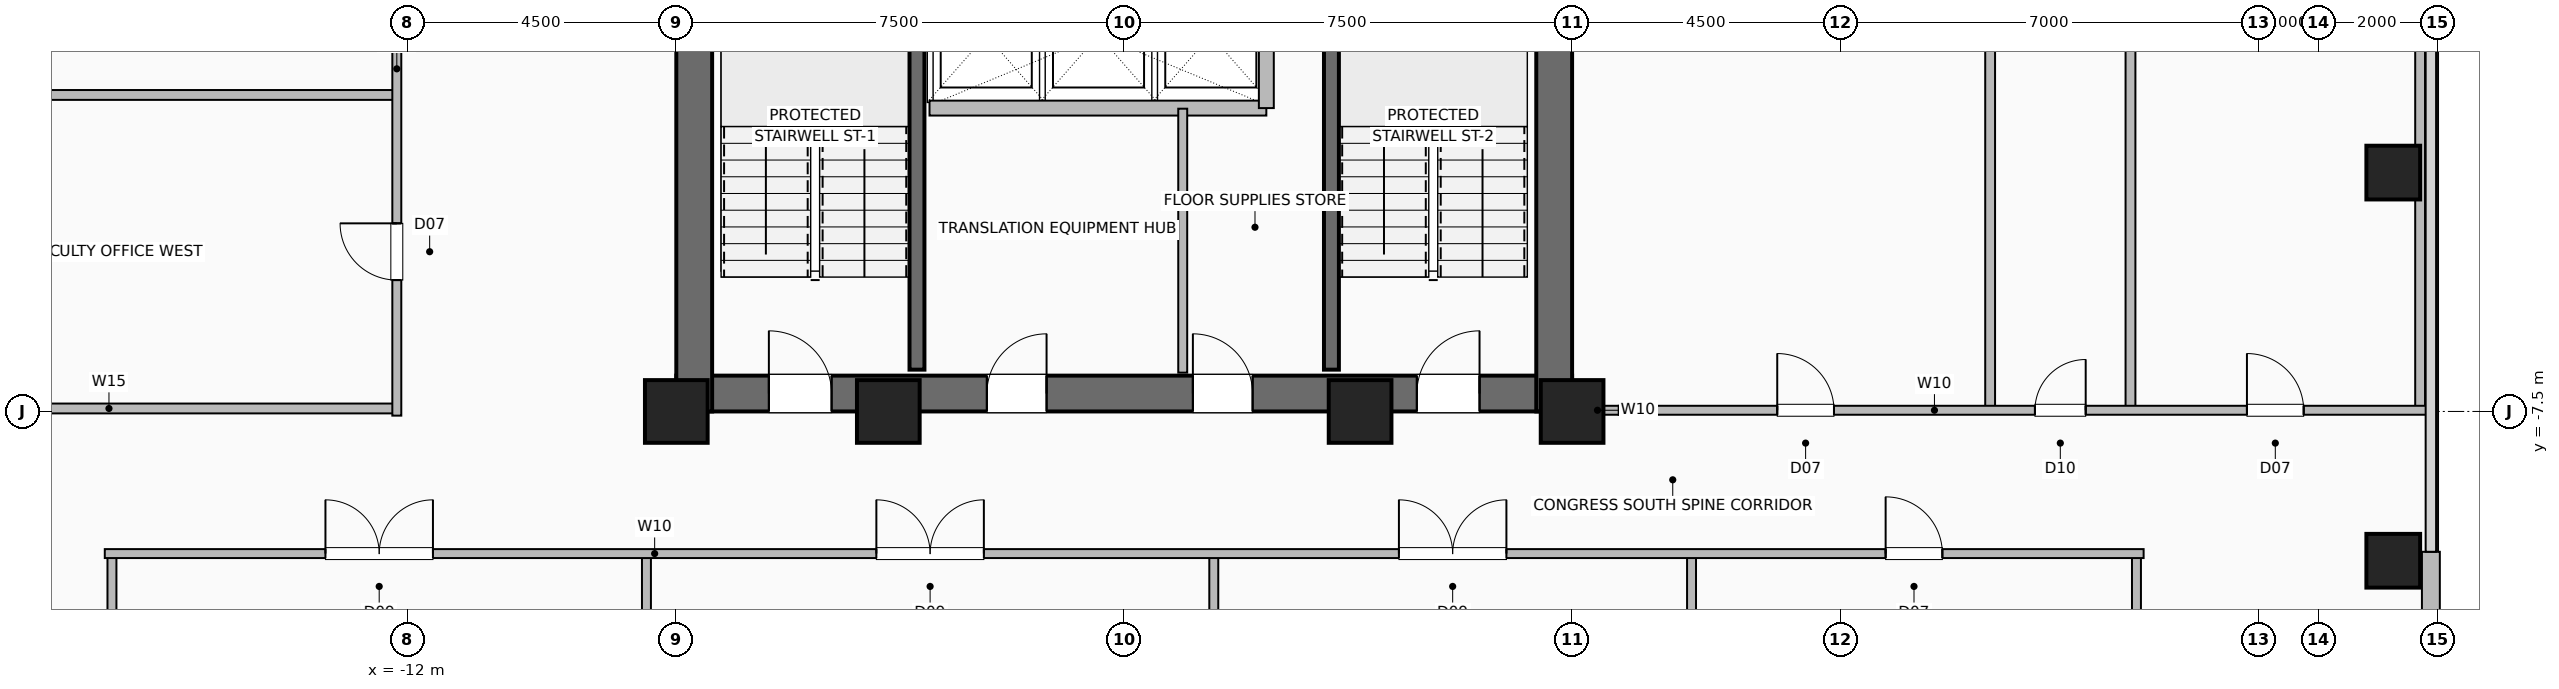
"""IFC4 building model, lengths in metres.
Left out: names, types, materials, properties, quantities, classifications, styles, units other than length and angle.
Written with IfcOpenShell. Run it as: python <this file> out.ifc"""

import sys

from ifc_helpers import new_model, si_unit, direction, frame, frame_2d, origin, origin_2d, place, context, subcontext, project, spatial, rectangle, hollow_rectangle, extrude, element, fill, save


model = new_model("IFC4")
c1 = context("Model", 3, precision=1e-05, world=origin(), true_north=direction((0.0, 1.0)))
c2 = subcontext(c1, "Body", "Model", "MODEL_VIEW")
j1 = project(units=[si_unit("LENGTHUNIT", "METRE"), si_unit("PLANEANGLEUNIT", "RADIAN")], contexts=[c1])
p1 = place(None, origin())
s1 = spatial("IfcSite", under=j1, at=p1, CompositionType="ELEMENT")
p2 = place(p1, origin())
s2 = spatial("IfcBuilding", under=s1, at=p2, CompositionType="ELEMENT")
p3 = place(p2, frame((0.0, 0.0, 133.6)))
s3 = spatial("IfcBuildingStorey", under=s2, at=p3, CompositionType="ELEMENT", Elevation=133.6)
for number, where, z_axis, x_axis in (
    (1, (-7.5, -7.5, 0.0), (0.0, 0.0, 1.0), (1.0, 0.0, 0.0)),
    (2, (-3.95, -7.5, 0.0), (0.0, 0.0, 1.0), (1.0, 0.0, 0.0)),
    (3, (3.95, -7.5, 0.0), (0.0, 0.0, 1.0), (1.0, 0.0, 0.0)),
    (4, (7.5, -7.5, 0.0), (0.0, 0.0, 1.0), (1.0, 0.0, 0.0)),
):
    element("IfcColumn", number, at=place(p3, frame(where, z_axis=z_axis, x_axis=x_axis)), inside=s3, PredefinedType="COLUMN", context=c2, shape_type="SweptSolid", body=[
        extrude(hollow_rectangle(XDim=1.05, YDim=1.05, WallThickness=0.05, at=origin_2d()), origin(), (0.0, 0.0, 1.0), 3.6),
    ])
for number, where, z_axis, x_axis in (
    (5, (21.25, -10.0, 0.0), (0.0, 0.0, 1.0), (1.0, 0.0, 0.0)),
    (6, (21.25, -3.5, 0.0), (0.0, 0.0, 1.0), (1.0, 0.0, 0.0)),
):
    element("IfcColumn", number, at=place(p3, frame(where, z_axis=z_axis, x_axis=x_axis)), inside=s3, PredefinedType="COLUMN", context=c2, shape_type="SweptSolid", body=[
        extrude(hollow_rectangle(XDim=0.9, YDim=0.9, WallThickness=0.045, at=origin_2d()), origin(), (0.0, 0.0, 1.0), 3.6),
    ])
p4 = place(p3, frame((21.88, -16.15, 0.0), z_axis=(0.0, 0.0, 1.0), x_axis=(0.0, 1.0, 0.0)))
e7 = element("IfcWall", 7, at=p4, inside=s3, PredefinedType="SOLIDWALL", context=c2, shape_type="SweptSolid", body=[
    extrude(rectangle(XDim=6.3, YDim=0.3, at=frame_2d((3.15, 0.0))), origin(), (0.0, 0.0, 1.0), 3.36),
])
p5 = place(p3, frame((-7.5, -7.2, 0.0), z_axis=(0.0, 0.0, 1.0), x_axis=(1.0, 0.0, 0.0)))
e8 = element("IfcWall", 8, at=p5, inside=s3, PredefinedType="SHEAR", context=c2, shape_type="SweptSolid", body=[
    extrude(rectangle(XDim=15.0, YDim=0.6, at=frame_2d((7.5, 0.0))), origin(), (0.0, 0.0, 1.0), 3.36),
])
p6 = place(p5, frame((1.55, 0.0, 0.0)))
e9 = element("IfcOpeningElement", 9, at=p6, cuts=e8, PredefinedType="OPENING", context=c2, shape_type="SweptSolid", body=[
    extrude(rectangle(XDim=1.05, YDim=2.08, at=frame_2d((0.525, 1.04))), frame((0.0, 0.31, 0.0), z_axis=(0.0, -1.0, 0.0), x_axis=(1.0, 0.0, 0.0)), (0.0, 0.0, 1.0), 0.62),
])
p7 = place(p5, frame((12.4, 0.0, 0.0)))
e10 = element("IfcOpeningElement", 10, at=p7, cuts=e8, PredefinedType="OPENING", context=c2, shape_type="SweptSolid", body=[
    extrude(rectangle(XDim=1.05, YDim=2.08, at=frame_2d((0.525, 1.04))), frame((0.0, 0.31, 0.0), z_axis=(0.0, -1.0, 0.0), x_axis=(1.0, 0.0, 0.0)), (0.0, 0.0, 1.0), 0.62),
])
p8 = place(p5, frame((5.2, 0.0, 0.0)))
e11 = element("IfcOpeningElement", 11, at=p8, cuts=e8, PredefinedType="OPENING", context=c2, shape_type="SweptSolid", body=[
    extrude(rectangle(XDim=1.0, YDim=2.08, at=frame_2d((0.5, 1.04))), frame((0.0, 0.31, 0.0), z_axis=(0.0, -1.0, 0.0), x_axis=(1.0, 0.0, 0.0)), (0.0, 0.0, 1.0), 0.62),
])
p9 = place(p5, frame((8.65, 0.0, 0.0)))
e12 = element("IfcOpeningElement", 12, at=p9, cuts=e8, PredefinedType="OPENING", context=c2, shape_type="SweptSolid", body=[
    extrude(rectangle(XDim=1.0, YDim=2.08, at=frame_2d((0.5, 1.04))), frame((0.0, 0.31, 0.0), z_axis=(0.0, -1.0, 0.0), x_axis=(1.0, 0.0, 0.0)), (0.0, 0.0, 1.0), 0.62),
])
p10 = place(p3, frame((-7.2, -7.5, 0.0), z_axis=(0.0, 0.0, 1.0), x_axis=(0.0, 1.0, 0.0)))
e13 = element("IfcWall", 13, at=p10, inside=s3, PredefinedType="SHEAR", context=c2, shape_type="SweptSolid", body=[
    extrude(rectangle(XDim=15.0, YDim=0.6, at=frame_2d((7.5, 0.0))), origin(), (0.0, 0.0, 1.0), 3.36),
])
p11 = place(p10, frame((9.5, 0.0, 0.0)))
e14 = element("IfcOpeningElement", 14, at=p11, cuts=e13, PredefinedType="OPENING", context=c2, shape_type="SweptSolid", body=[
    extrude(rectangle(XDim=1.0, YDim=2.08, at=frame_2d((0.5, 1.04))), frame((0.0, 0.31, 0.0), z_axis=(0.0, -1.0, 0.0), x_axis=(1.0, 0.0, 0.0)), (0.0, 0.0, 1.0), 0.62),
])
p12 = place(p3, frame((7.2, -7.5, 0.0), z_axis=(0.0, 0.0, 1.0), x_axis=(0.0, 1.0, 0.0)))
e15 = element("IfcWall", 15, at=p12, inside=s3, PredefinedType="SHEAR", context=c2, shape_type="SweptSolid", body=[
    extrude(rectangle(XDim=15.0, YDim=0.6, at=frame_2d((7.5, 0.0))), origin(), (0.0, 0.0, 1.0), 3.36),
])
for number, where, z_axis, x_axis in (
    (16, (-3.47, -6.8, 0.0), (0.0, 0.0, 1.0), (0.0, 1.0, 0.0)),
    (17, (3.47, -6.8, 0.0), (0.0, 0.0, 1.0), (0.0, 1.0, 0.0)),
):
    element("IfcWall", number, at=place(p3, frame(where, z_axis=z_axis, x_axis=x_axis)), inside=s3, PredefinedType="SHEAR", context=c2, shape_type="SweptSolid", body=[
        extrude(rectangle(XDim=7.72, YDim=0.25, at=frame_2d((3.86, 0.0))), origin(), (0.0, 0.0, 1.0), 3.36),
    ])
p13 = place(p3, frame((-3.26, -2.42, 0.0), z_axis=(0.0, 0.0, 1.0), x_axis=(1.0, 0.0, 0.0)))
e18 = element("IfcWall", 18, at=p13, inside=s3, PredefinedType="SHEAR", context=c2, shape_type="SweptSolid", body=[
    extrude(rectangle(XDim=5.64, YDim=0.25, at=frame_2d((2.82, 0.0))), origin(), (0.0, 0.0, 1.0), 3.36),
])
p14 = place(p3, frame((2.38, -2.42, 0.0), z_axis=(0.0, 0.0, 1.0), x_axis=(0.0, 1.0, 0.0)))
e19 = element("IfcWall", 19, at=p14, inside=s3, PredefinedType="SHEAR", context=c2, shape_type="SweptSolid", body=[
    extrude(rectangle(XDim=2.44, YDim=0.25, at=frame_2d((1.22, 0.0))), origin(), (0.0, 0.0, 1.0), 3.36),
])
p15 = place(p3, frame((0.98, -6.85, 0.0), z_axis=(0.0, 0.0, 1.0), x_axis=(0.0, 1.0, 0.0)))
e20 = element("IfcWall", 20, at=p15, inside=s3, PredefinedType="PARTITIONING", context=c2, shape_type="SweptSolid", body=[
    extrude(rectangle(XDim=4.42, YDim=0.15, at=frame_2d((2.21, 0.0))), origin(), (0.0, 0.0, 1.0), 3.36),
])
for number, where, z_axis, x_axis in (
    (21, (-16.95, -21.82, 0.0), (0.0, 0.0, 1.0), (0.0, 1.0, 0.0)),
    (22, (-8.0, -21.82, 0.0), (0.0, 0.0, 1.0), (0.0, 1.0, 0.0)),
    (23, (1.5, -21.82, 0.0), (0.0, 0.0, 1.0), (0.0, 1.0, 0.0)),
    (24, (9.5, -21.82, 0.0), (0.0, 0.0, 1.0), (0.0, 1.0, 0.0)),
    (25, (16.95, -21.82, 0.0), (0.0, 0.0, 1.0), (0.0, 1.0, 0.0)),
):
    element("IfcWall", number, at=place(p3, frame(where, z_axis=z_axis, x_axis=x_axis)), inside=s3, PredefinedType="PARTITIONING", context=c2, shape_type="SweptSolid", body=[
        extrude(rectangle(XDim=11.94, YDim=0.15, at=frame_2d((5.97, 0.0))), origin(), (0.0, 0.0, 1.0), 3.36),
    ])
p16 = place(p3, frame((-17.07, -9.88, 0.0), z_axis=(0.0, 0.0, 1.0), x_axis=(1.0, 0.0, 0.0)))
e26 = element("IfcWall", 26, at=p16, inside=s3, PredefinedType="PARTITIONING", context=c2, shape_type="SweptSolid", body=[
    extrude(rectangle(XDim=34.14, YDim=0.15, at=frame_2d((17.07, 0.0))), origin(), (0.0, 0.0, 1.0), 3.36),
])
p17 = place(p16, frame((3.695, 0.0, 0.0)))
e27 = element("IfcOpeningElement", 27, at=p17, cuts=e26, PredefinedType="OPENING", context=c2, shape_type="SweptSolid", body=[
    extrude(rectangle(XDim=1.8, YDim=2.08, at=frame_2d((0.9, 1.04))), frame((0.0, 0.085, 0.0), z_axis=(0.0, -1.0, 0.0), x_axis=(1.0, 0.0, 0.0)), (0.0, 0.0, 1.0), 0.17),
])
p18 = place(p16, frame((12.92, 0.0, 0.0)))
e28 = element("IfcOpeningElement", 28, at=p18, cuts=e26, PredefinedType="OPENING", context=c2, shape_type="SweptSolid", body=[
    extrude(rectangle(XDim=1.8, YDim=2.08, at=frame_2d((0.9, 1.04))), frame((0.0, 0.085, 0.0), z_axis=(0.0, -1.0, 0.0), x_axis=(1.0, 0.0, 0.0)), (0.0, 0.0, 1.0), 0.17),
])
p19 = place(p16, frame((21.67, 0.0, 0.0)))
e29 = element("IfcOpeningElement", 29, at=p19, cuts=e26, PredefinedType="OPENING", context=c2, shape_type="SweptSolid", body=[
    extrude(rectangle(XDim=1.8, YDim=2.08, at=frame_2d((0.9, 1.04))), frame((0.0, 0.085, 0.0), z_axis=(0.0, -1.0, 0.0), x_axis=(1.0, 0.0, 0.0)), (0.0, 0.0, 1.0), 0.17),
])
p20 = place(p16, frame((29.82, 0.0, 0.0)))
e30 = element("IfcOpeningElement", 30, at=p20, cuts=e26, PredefinedType="OPENING", context=c2, shape_type="SweptSolid", body=[
    extrude(rectangle(XDim=0.95, YDim=2.06, at=frame_2d((0.475, 1.03))), frame((0.0, 0.085, 0.0), z_axis=(0.0, -1.0, 0.0), x_axis=(1.0, 0.0, 0.0)), (0.0, 0.0, 1.0), 0.17),
])
for number, where, z_axis, x_axis in (
    (31, (-21.82, -7.45, 0.0), (0.0, 0.0, 1.0), (1.0, 0.0, 0.0)),
    (32, (-21.82, -2.2, 0.0), (0.0, 0.0, 1.0), (1.0, 0.0, 0.0)),
):
    element("IfcWall", number, at=place(p3, frame(where, z_axis=z_axis, x_axis=x_axis)), inside=s3, PredefinedType="PLUMBINGWALL", context=c2, shape_type="SweptSolid", body=[
        extrude(rectangle(XDim=9.64, YDim=0.165, at=frame_2d((4.82, 0.0))), origin(), (0.0, 0.0, 1.0), 3.36),
    ])
p21 = place(p3, frame((-12.18, -7.57, 0.0), z_axis=(0.0, 0.0, 1.0), x_axis=(0.0, 1.0, 0.0)))
e33 = element("IfcWall", 33, at=p21, inside=s3, PredefinedType="PARTITIONING", context=c2, shape_type="SweptSolid", body=[
    extrude(rectangle(XDim=15.14, YDim=0.15, at=frame_2d((7.57, 0.0))), origin(), (0.0, 0.0, 1.0), 3.36),
])
p22 = place(p21, frame((2.27, 0.0, 0.0)))
e34 = element("IfcOpeningElement", 34, at=p22, cuts=e33, PredefinedType="OPENING", context=c2, shape_type="SweptSolid", body=[
    extrude(rectangle(XDim=0.95, YDim=2.06, at=frame_2d((0.475, 1.03))), frame((0.0, 0.085, 0.0), z_axis=(0.0, -1.0, 0.0), x_axis=(1.0, 0.0, 0.0)), (0.0, 0.0, 1.0), 0.17),
])
p23 = place(p21, frame((8.395, 0.0, 0.0)))
e35 = element("IfcOpeningElement", 35, at=p23, cuts=e33, PredefinedType="OPENING", context=c2, shape_type="SweptSolid", body=[
    extrude(rectangle(XDim=0.95, YDim=2.06, at=frame_2d((0.475, 1.03))), frame((0.0, 0.085, 0.0), z_axis=(0.0, -1.0, 0.0), x_axis=(1.0, 0.0, 0.0)), (0.0, 0.0, 1.0), 0.17),
])
p24 = place(p21, frame((13.27, 0.0, 0.0)))
e36 = element("IfcOpeningElement", 36, at=p24, cuts=e33, PredefinedType="OPENING", context=c2, shape_type="SweptSolid", body=[
    extrude(rectangle(XDim=0.85, YDim=2.05, at=frame_2d((0.425, 1.025))), frame((0.0, 0.085, 0.0), z_axis=(0.0, -1.0, 0.0), x_axis=(1.0, 0.0, 0.0)), (0.0, 0.0, 1.0), 0.17),
])
p25 = place(p3, frame((7.45, -7.48, 0.0), z_axis=(0.0, 0.0, 1.0), x_axis=(1.0, 0.0, 0.0)))
e37 = element("IfcWall", 37, at=p25, inside=s3, PredefinedType="PARTITIONING", context=c2, shape_type="SweptSolid", body=[
    extrude(rectangle(XDim=0.95, YDim=0.15, at=frame_2d((0.475, 0.0))), origin(), (0.0, 0.0, 1.0), 3.36),
])
for number, where, z_axis, x_axis in (
    (38, (16.85, -7.48, 0.0), (0.0, 0.0, 1.0), (0.0, 1.0, 0.0)),
    (39, (14.5, -7.48, 0.0), (0.0, 0.0, 1.0), (0.0, 1.0, 0.0)),
    (40, (21.7, -7.48, 0.0), (0.0, 0.0, 1.0), (0.0, 1.0, 0.0)),
):
    element("IfcWall", number, at=place(p3, frame(where, z_axis=z_axis, x_axis=x_axis)), inside=s3, PredefinedType="PLUMBINGWALL", context=c2, shape_type="SweptSolid", body=[
        extrude(rectangle(XDim=14.88, YDim=0.165, at=frame_2d((7.44, 0.0))), origin(), (0.0, 0.0, 1.0), 3.36),
    ])
p26 = place(p3, frame((8.28, -7.48, 0.0), z_axis=(0.0, 0.0, 1.0), x_axis=(1.0, 0.0, 0.0)))
e41 = element("IfcWall", 41, at=p26, inside=s3, PredefinedType="PARTITIONING", context=c2, shape_type="SweptSolid", body=[
    extrude(rectangle(XDim=13.54, YDim=0.15, at=frame_2d((6.77, 0.0))), origin(), (0.0, 0.0, 1.0), 3.36),
])
p27 = place(p26, frame((2.655, 0.0, 0.0)))
e42 = element("IfcOpeningElement", 42, at=p27, cuts=e41, PredefinedType="OPENING", context=c2, shape_type="SweptSolid", body=[
    extrude(rectangle(XDim=0.95, YDim=2.06, at=frame_2d((0.475, 1.03))), frame((0.0, 0.085, 0.0), z_axis=(0.0, -1.0, 0.0), x_axis=(1.0, 0.0, 0.0)), (0.0, 0.0, 1.0), 0.17),
])
p28 = place(p26, frame((6.97, 0.0, 0.0)))
e43 = element("IfcOpeningElement", 43, at=p28, cuts=e41, PredefinedType="OPENING", context=c2, shape_type="SweptSolid", body=[
    extrude(rectangle(XDim=0.85, YDim=2.05, at=frame_2d((0.425, 1.025))), frame((0.0, 0.085, 0.0), z_axis=(0.0, -1.0, 0.0), x_axis=(1.0, 0.0, 0.0)), (0.0, 0.0, 1.0), 0.17),
])
p29 = place(p26, frame((10.52, 0.0, 0.0)))
e44 = element("IfcOpeningElement", 44, at=p29, cuts=e41, PredefinedType="OPENING", context=c2, shape_type="SweptSolid", body=[
    extrude(rectangle(XDim=0.95, YDim=2.06, at=frame_2d((0.475, 1.03))), frame((0.0, 0.085, 0.0), z_axis=(0.0, -1.0, 0.0), x_axis=(1.0, 0.0, 0.0)), (0.0, 0.0, 1.0), 0.17),
])
p30 = place(p6, origin())
e45 = element("IfcDoor", 45, at=p30, inside=s3, OperationType="SINGLE_SWING_LEFT", PredefinedType="DOOR", context=c2, shape_type="SweptSolid", body=[
    extrude(rectangle(XDim=1.05, YDim=2.08, at=frame_2d((0.525, 1.04))), frame((0.0, 0.025, 0.0), z_axis=(0.0, -1.0, 0.0), x_axis=(1.0, 0.0, 0.0)), (0.0, 0.0, 1.0), 0.05),
])
fill(e9, e45)
p31 = place(p7, origin())
e46 = element("IfcDoor", 46, at=p31, inside=s3, OperationType="SINGLE_SWING_RIGHT", PredefinedType="DOOR", context=c2, shape_type="SweptSolid", body=[
    extrude(rectangle(XDim=1.05, YDim=2.08, at=frame_2d((0.525, 1.04))), frame((0.0, 0.025, 0.0), z_axis=(0.0, -1.0, 0.0), x_axis=(1.0, 0.0, 0.0)), (0.0, 0.0, 1.0), 0.05),
])
fill(e10, e46)
p32 = place(p8, origin())
e47 = element("IfcDoor", 47, at=p32, inside=s3, OperationType="SINGLE_SWING_RIGHT", PredefinedType="DOOR", context=c2, shape_type="SweptSolid", body=[
    extrude(rectangle(XDim=1.0, YDim=2.08, at=frame_2d((0.5, 1.04))), frame((0.0, 0.025, 0.0), z_axis=(0.0, -1.0, 0.0), x_axis=(1.0, 0.0, 0.0)), (0.0, 0.0, 1.0), 0.05),
])
fill(e11, e47)
p33 = place(p9, origin())
e48 = element("IfcDoor", 48, at=p33, inside=s3, OperationType="SINGLE_SWING_LEFT", PredefinedType="DOOR", context=c2, shape_type="SweptSolid", body=[
    extrude(rectangle(XDim=1.0, YDim=2.08, at=frame_2d((0.5, 1.04))), frame((0.0, 0.025, 0.0), z_axis=(0.0, -1.0, 0.0), x_axis=(1.0, 0.0, 0.0)), (0.0, 0.0, 1.0), 0.05),
])
fill(e12, e48)
p34 = place(p17, origin())
e49 = element("IfcDoor", 49, at=p34, inside=s3, OperationType="DOUBLE_DOOR_SINGLE_SWING", PredefinedType="DOOR", context=c2, shape_type="SweptSolid", body=[
    extrude(rectangle(XDim=1.8, YDim=2.08, at=frame_2d((0.9, 1.04))), frame((0.0, 0.025, 0.0), z_axis=(0.0, -1.0, 0.0), x_axis=(1.0, 0.0, 0.0)), (0.0, 0.0, 1.0), 0.05),
])
fill(e27, e49)
p35 = place(p18, origin())
e50 = element("IfcDoor", 50, at=p35, inside=s3, OperationType="DOUBLE_DOOR_SINGLE_SWING", PredefinedType="DOOR", context=c2, shape_type="SweptSolid", body=[
    extrude(rectangle(XDim=1.8, YDim=2.08, at=frame_2d((0.9, 1.04))), frame((0.0, 0.025, 0.0), z_axis=(0.0, -1.0, 0.0), x_axis=(1.0, 0.0, 0.0)), (0.0, 0.0, 1.0), 0.05),
])
fill(e28, e50)
p36 = place(p19, origin())
e51 = element("IfcDoor", 51, at=p36, inside=s3, OperationType="DOUBLE_DOOR_SINGLE_SWING", PredefinedType="DOOR", context=c2, shape_type="SweptSolid", body=[
    extrude(rectangle(XDim=1.8, YDim=2.08, at=frame_2d((0.9, 1.04))), frame((0.0, 0.025, 0.0), z_axis=(0.0, -1.0, 0.0), x_axis=(1.0, 0.0, 0.0)), (0.0, 0.0, 1.0), 0.05),
])
fill(e29, e51)
p37 = place(p20, origin())
e52 = element("IfcDoor", 52, at=p37, inside=s3, OperationType="SINGLE_SWING_LEFT", PredefinedType="DOOR", context=c2, shape_type="SweptSolid", body=[
    extrude(rectangle(XDim=0.95, YDim=2.06, at=frame_2d((0.475, 1.03))), frame((0.0, 0.025, 0.0), z_axis=(0.0, -1.0, 0.0), x_axis=(1.0, 0.0, 0.0)), (0.0, 0.0, 1.0), 0.05),
])
fill(e30, e52)
p38 = place(p22, origin())
e53 = element("IfcDoor", 53, at=p38, inside=s3, OperationType="SINGLE_SWING_RIGHT", PredefinedType="DOOR", context=c2, shape_type="SweptSolid", body=[
    extrude(rectangle(XDim=0.95, YDim=2.06, at=frame_2d((0.475, 1.03))), frame((0.0, 0.025, 0.0), z_axis=(0.0, -1.0, 0.0), x_axis=(1.0, 0.0, 0.0)), (0.0, 0.0, 1.0), 0.05),
])
fill(e34, e53)
p39 = place(p27, origin())
e54 = element("IfcDoor", 54, at=p39, inside=s3, OperationType="SINGLE_SWING_LEFT", PredefinedType="DOOR", context=c2, shape_type="SweptSolid", body=[
    extrude(rectangle(XDim=0.95, YDim=2.06, at=frame_2d((0.475, 1.03))), frame((0.0, 0.025, 0.0), z_axis=(0.0, -1.0, 0.0), x_axis=(1.0, 0.0, 0.0)), (0.0, 0.0, 1.0), 0.05),
])
fill(e42, e54)
p40 = place(p28, origin())
e55 = element("IfcDoor", 55, at=p40, inside=s3, OperationType="SINGLE_SWING_RIGHT", PredefinedType="DOOR", context=c2, shape_type="SweptSolid", body=[
    extrude(rectangle(XDim=0.85, YDim=2.05, at=frame_2d((0.425, 1.025))), frame((0.0, 0.025, 0.0), z_axis=(0.0, -1.0, 0.0), x_axis=(1.0, 0.0, 0.0)), (0.0, 0.0, 1.0), 0.05),
])
fill(e43, e55)
p41 = place(p29, origin())
e56 = element("IfcDoor", 56, at=p41, inside=s3, OperationType="SINGLE_SWING_LEFT", PredefinedType="DOOR", context=c2, shape_type="SweptSolid", body=[
    extrude(rectangle(XDim=0.95, YDim=2.06, at=frame_2d((0.475, 1.03))), frame((0.0, 0.025, 0.0), z_axis=(0.0, -1.0, 0.0), x_axis=(1.0, 0.0, 0.0)), (0.0, 0.0, 1.0), 0.05),
])
fill(e44, e56)
save(model, sys.argv[1])
